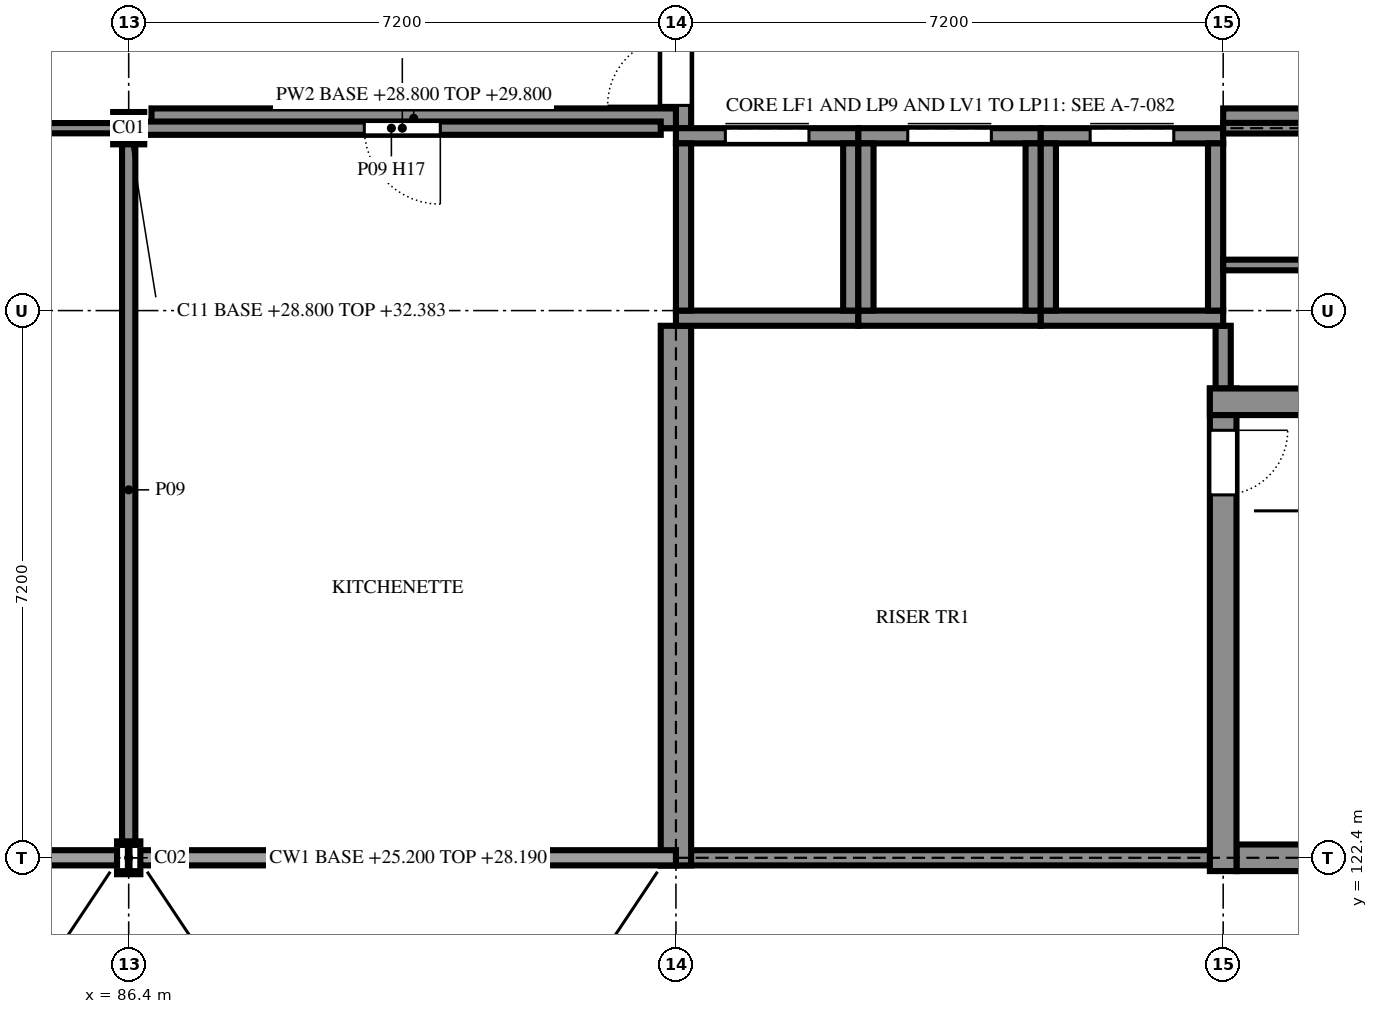
"""IFC4 building model, lengths in metres.
Left out: names, types, materials, properties, quantities, classifications, styles, units other than length and angle.
Written with IfcOpenShell. Run it as: python <this file> out.ifc"""

import sys

from ifc_helpers import new_model, si_unit, direction, frame, frame_2d, origin, origin_2d, place, context, subcontext, project, spatial, rectangle, i_section, extrude, element, fill, save


model = new_model("IFC4")
c1 = context("Model", 3, precision=1e-05, world=origin(), true_north=direction((0.0, 1.0)))
c2 = subcontext(c1, "Body", "Model", "MODEL_VIEW")
j1 = project(units=[si_unit("LENGTHUNIT", "METRE"), si_unit("PLANEANGLEUNIT", "RADIAN")], contexts=[c1])
p1 = place(None, origin())
s1 = spatial("IfcSite", under=j1, at=p1, CompositionType="ELEMENT")
p2 = place(p1, origin())
s2 = spatial("IfcBuilding", under=s1, at=p2, CompositionType="ELEMENT")
p3 = place(p2, frame((0.0, 0.0, 25.2)))
s3 = spatial("IfcBuildingStorey", under=s2, at=p3, CompositionType="ELEMENT", Elevation=25.2)
p4 = place(p3, frame((86.4, 122.4, 0.0), z_axis=(0.0, 0.0, 1.0), x_axis=(1.0, 0.0, 0.0)))
e1 = element("IfcColumn", 1, at=p4, inside=s3, PredefinedType="COLUMN", context=c2, shape_type="SweptSolid", body=[
    extrude(i_section(OverallWidth=0.307, OverallDepth=0.432, WebThickness=0.021, FlangeThickness=0.04, FilletRadius=0.027, at=origin_2d()), origin(), (0.0, 0.0, 1.0), 3.6),
])
p5 = place(p3, frame((86.4, 132.0, 0.0), z_axis=(0.0, 0.0, 1.0), x_axis=(1.0, 0.0, 0.0)))
e2 = element("IfcColumn", 2, at=p5, inside=s3, PredefinedType="COLUMN", context=c2, shape_type="SweptSolid", body=[
    extrude(i_section(OverallWidth=0.409, OverallDepth=0.425, WebThickness=0.033, FlangeThickness=0.052, FilletRadius=0.015, at=origin_2d()), origin(), (0.0, 0.0, 1.0), 3.6),
])
p6 = place(p3, frame((93.4, 122.4, 0.0), z_axis=(0.0, 0.0, 1.0), x_axis=(1.0, 0.0, 0.0)))
e3 = element("IfcWall", 3, at=p6, inside=s3, PredefinedType="SHEAR", context=c2, shape_type="SweptSolid", body=[
    extrude(rectangle(XDim=7.575, YDim=0.2, at=frame_2d((3.788, 0.0))), origin(), (0.0, 0.0, 1.0), 3.6),
])
p7 = place(p3, frame((100.975, 122.4, 0.0), z_axis=(0.0, 0.0, 1.0), x_axis=(1.0, 0.0, 0.0)))
e4 = element("IfcWall", 4, at=p7, inside=s3, PredefinedType="SHEAR", context=c2, shape_type="SweptSolid", body=[
    extrude(rectangle(XDim=3.225, YDim=0.35, at=frame_2d((1.612, 0.0))), origin(), (0.0, 0.0, 1.0), 3.6),
])
p8 = place(p7, frame((1.25, 0.0, 0.6)))
e5 = element("IfcOpeningElement", 5, at=p8, cuts=e4, PredefinedType="OPENING", context=c2, shape_type="SweptSolid", body=[
    extrude(rectangle(XDim=0.9, YDim=2.1, at=frame_2d((0.45, 1.05))), frame((0.0, 0.185, 0.0), z_axis=(0.0, -1.0, 0.0), x_axis=(1.0, 0.0, 0.0)), (0.0, 0.0, 1.0), 0.37),
])
p9 = place(p3, frame((100.8, 128.575, 0.0), z_axis=(0.0, 0.0, 1.0), x_axis=(0.0, -1.0, 0.0)))
e6 = element("IfcWall", 6, at=p9, inside=s3, PredefinedType="SHEAR", context=c2, shape_type="SweptSolid", body=[
    extrude(rectangle(XDim=6.35, YDim=0.35, at=frame_2d((3.175, 0.0))), origin(), (0.0, 0.0, 1.0), 3.6),
])
p10 = place(p9, frame((0.55, 0.0, 0.0)))
e7 = element("IfcOpeningElement", 7, at=p10, cuts=e6, PredefinedType="OPENING", context=c2, shape_type="SweptSolid", body=[
    extrude(rectangle(XDim=0.85, YDim=2.1, at=frame_2d((0.425, 1.05))), frame((0.0, 0.185, 0.0), z_axis=(0.0, -1.0, 0.0), x_axis=(1.0, 0.0, 0.0)), (0.0, 0.0, 1.0), 0.37),
])
p11 = place(p3, frame((100.8, 128.575, 0.0), z_axis=(0.0, 0.0, 1.0), x_axis=(0.0, 1.0, 0.0)))
e8 = element("IfcWall", 8, at=p11, inside=s3, PredefinedType="SHEAR", context=c2, shape_type="SweptSolid", body=[
    extrude(rectangle(XDim=0.825, YDim=0.2, at=frame_2d((0.413, 0.0))), origin(), (0.0, 0.0, 1.0), 3.6),
])
p12 = place(p3, frame((104.375, 128.4, 0.0), z_axis=(0.0, 0.0, 1.0), x_axis=(-1.0, 0.0, 0.0)))
e9 = element("IfcWall", 9, at=p12, inside=s3, PredefinedType="SHEAR", context=c2, shape_type="SweptSolid", body=[
    extrude(rectangle(XDim=3.75, YDim=0.35, at=frame_2d((1.875, 0.0))), origin(), (0.0, 0.0, 1.0), 3.6),
])
p13 = place(p12, frame((1.375, 0.0, 0.0)))
e10 = element("IfcOpeningElement", 10, at=p13, cuts=e9, PredefinedType="OPENING", context=c2, shape_type="SweptSolid", body=[
    extrude(rectangle(XDim=1.0, YDim=2.1, at=frame_2d((0.5, 1.05))), frame((0.0, 0.185, 0.0), z_axis=(0.0, -1.0, 0.0), x_axis=(1.0, 0.0, 0.0)), (0.0, 0.0, 1.0), 0.37),
])
p14 = place(p3, frame((93.6, 129.4, 0.0), z_axis=(0.0, 0.0, 1.0), x_axis=(0.0, -1.0, 0.0)))
e11 = element("IfcWall", 11, at=p14, inside=s3, PredefinedType="SHEAR", context=c2, shape_type="SweptSolid", body=[
    extrude(rectangle(XDim=7.1, YDim=0.4, at=frame_2d((3.55, 0.0))), origin(), (0.0, 0.0, 1.0), 3.6),
])
p15 = place(p3, frame((93.6, 132.0, 0.0), z_axis=(0.0, 0.0, 1.0), x_axis=(0.0, 1.0, 0.0)))
e12 = element("IfcWall", 12, at=p15, inside=s3, PredefinedType="SHEAR", context=c2, shape_type="SweptSolid", body=[
    extrude(rectangle(XDim=2.4, YDim=0.4, at=frame_2d((1.2, 0.0))), origin(), (0.0, 0.0, 1.0), 3.6),
])
p16 = place(p15, frame((0.3, 0.0, 0.0)))
e13 = element("IfcOpeningElement", 13, at=p16, cuts=e12, PredefinedType="OPENING", context=c2, shape_type="SweptSolid", body=[
    extrude(rectangle(XDim=1.8, YDim=2.1, at=frame_2d((0.9, 1.05))), frame((0.0, 0.21, 0.0), z_axis=(0.0, -1.0, 0.0), x_axis=(1.0, 0.0, 0.0)), (0.0, 0.0, 1.0), 0.42),
])
p17 = place(p3, frame((86.7, 132.13, 3.6), z_axis=(0.0, 0.0, 1.0), x_axis=(1.0, 0.0, 0.0)))
e14 = element("IfcWall", 14, at=p17, inside=s3, PredefinedType="PARAPET", context=c2, shape_type="SweptSolid", body=[
    extrude(rectangle(XDim=6.9, YDim=0.26, at=frame_2d((3.45, 0.0))), origin(), (0.0, 0.0, 1.0), 1.0),
])
p18 = place(p3, frame((100.8, 132.13, 3.6), z_axis=(0.0, 0.0, 1.0), x_axis=(1.0, 0.0, 0.0)))
e15 = element("IfcWall", 15, at=p18, inside=s3, PredefinedType="PARAPET", context=c2, shape_type="SweptSolid", body=[
    extrude(rectangle(XDim=4.8, YDim=0.26, at=frame_2d((2.4, 0.0))), origin(), (0.0, 0.0, 1.0), 1.0),
])
p19 = place(p3, frame((86.4, 132.0, 3.6), z_axis=(0.0, 0.0, 1.0), x_axis=(1.0, 0.0, 0.0)))
e16 = element("IfcColumn", 16, at=p19, inside=s3, PredefinedType="COLUMN", context=c2, shape_type="SweptSolid", body=[
    extrude(i_section(OverallWidth=0.2, OverallDepth=0.2, WebThickness=0.009, FlangeThickness=0.015, FilletRadius=0.018, at=origin_2d()), origin(), (0.0, 0.0, 1.0), 3.583),
])
p20 = place(p3, frame((93.6, 129.5, 0.0), z_axis=(0.0, 0.0, 1.0), x_axis=(1.0, 0.0, 0.0)))
e17 = element("IfcWall", 17, at=p20, inside=s3, PredefinedType="SHEAR", context=c2, shape_type="SweptSolid", body=[
    extrude(rectangle(XDim=2.4, YDim=0.2, at=frame_2d((1.2, 0.0))), origin(), (0.0, 0.0, 1.0), 4.5),
])
p21 = place(p3, frame((93.6, 131.9, 0.0), z_axis=(0.0, 0.0, 1.0), x_axis=(1.0, 0.0, 0.0)))
e18 = element("IfcWall", 18, at=p21, inside=s3, PredefinedType="SHEAR", context=c2, shape_type="SweptSolid", body=[
    extrude(rectangle(XDim=2.4, YDim=0.2, at=frame_2d((1.2, 0.0))), origin(), (0.0, 0.0, 1.0), 4.5),
])
p22 = place(p21, frame((0.65, 0.0, 0.0)))
e19 = element("IfcOpeningElement", 19, at=p22, cuts=e18, PredefinedType="OPENING", context=c2, shape_type="SweptSolid", body=[
    extrude(rectangle(XDim=1.1, YDim=2.1, at=frame_2d((0.55, 1.05))), frame((0.0, 0.11, 0.0), z_axis=(0.0, -1.0, 0.0), x_axis=(1.0, 0.0, 0.0)), (0.0, 0.0, 1.0), 0.22),
])
for number, where, z_axis, x_axis in (
    (20, (93.7, 129.6, 0.0), (0.0, 0.0, 1.0), (0.0, 1.0, 0.0)),
    (21, (95.9, 129.6, 0.0), (0.0, 0.0, 1.0), (0.0, 1.0, 0.0)),
):
    element("IfcWall", number, at=place(p3, frame(where, z_axis=z_axis, x_axis=x_axis)), inside=s3, PredefinedType="SHEAR", context=c2, shape_type="SweptSolid", body=[
        extrude(rectangle(XDim=2.2, YDim=0.2, at=frame_2d((1.1, 0.0))), origin(), (0.0, 0.0, 1.0), 4.5),
    ])
p23 = place(p3, frame((96.0, 129.5, 0.0), z_axis=(0.0, 0.0, 1.0), x_axis=(1.0, 0.0, 0.0)))
e22 = element("IfcWall", 22, at=p23, inside=s3, PredefinedType="SHEAR", context=c2, shape_type="SweptSolid", body=[
    extrude(rectangle(XDim=2.4, YDim=0.2, at=frame_2d((1.2, 0.0))), origin(), (0.0, 0.0, 1.0), 4.5),
])
p24 = place(p3, frame((96.0, 131.9, 0.0), z_axis=(0.0, 0.0, 1.0), x_axis=(1.0, 0.0, 0.0)))
e23 = element("IfcWall", 23, at=p24, inside=s3, PredefinedType="SHEAR", context=c2, shape_type="SweptSolid", body=[
    extrude(rectangle(XDim=2.4, YDim=0.2, at=frame_2d((1.2, 0.0))), origin(), (0.0, 0.0, 1.0), 4.5),
])
p25 = place(p24, frame((0.65, 0.0, 0.0)))
e24 = element("IfcOpeningElement", 24, at=p25, cuts=e23, PredefinedType="OPENING", context=c2, shape_type="SweptSolid", body=[
    extrude(rectangle(XDim=1.1, YDim=2.1, at=frame_2d((0.55, 1.05))), frame((0.0, 0.11, 0.0), z_axis=(0.0, -1.0, 0.0), x_axis=(1.0, 0.0, 0.0)), (0.0, 0.0, 1.0), 0.22),
])
for number, where, z_axis, x_axis in (
    (25, (96.1, 129.6, 0.0), (0.0, 0.0, 1.0), (0.0, 1.0, 0.0)),
    (26, (98.3, 129.6, 0.0), (0.0, 0.0, 1.0), (0.0, 1.0, 0.0)),
):
    element("IfcWall", number, at=place(p3, frame(where, z_axis=z_axis, x_axis=x_axis)), inside=s3, PredefinedType="SHEAR", context=c2, shape_type="SweptSolid", body=[
        extrude(rectangle(XDim=2.2, YDim=0.2, at=frame_2d((1.1, 0.0))), origin(), (0.0, 0.0, 1.0), 4.5),
    ])
p26 = place(p3, frame((98.4, 129.5, 0.0), z_axis=(0.0, 0.0, 1.0), x_axis=(1.0, 0.0, 0.0)))
e27 = element("IfcWall", 27, at=p26, inside=s3, PredefinedType="SHEAR", context=c2, shape_type="SweptSolid", body=[
    extrude(rectangle(XDim=2.4, YDim=0.2, at=frame_2d((1.2, 0.0))), origin(), (0.0, 0.0, 1.0), 4.5),
])
p27 = place(p3, frame((98.4, 131.9, 0.0), z_axis=(0.0, 0.0, 1.0), x_axis=(1.0, 0.0, 0.0)))
e28 = element("IfcWall", 28, at=p27, inside=s3, PredefinedType="SHEAR", context=c2, shape_type="SweptSolid", body=[
    extrude(rectangle(XDim=2.4, YDim=0.2, at=frame_2d((1.2, 0.0))), origin(), (0.0, 0.0, 1.0), 4.5),
])
p28 = place(p27, frame((0.65, 0.0, 0.0)))
e29 = element("IfcOpeningElement", 29, at=p28, cuts=e28, PredefinedType="OPENING", context=c2, shape_type="SweptSolid", body=[
    extrude(rectangle(XDim=1.1, YDim=2.1, at=frame_2d((0.55, 1.05))), frame((0.0, 0.11, 0.0), z_axis=(0.0, -1.0, 0.0), x_axis=(1.0, 0.0, 0.0)), (0.0, 0.0, 1.0), 0.22),
])
for number, where, z_axis, x_axis in (
    (30, (98.5, 129.6, 0.0), (0.0, 0.0, 1.0), (0.0, 1.0, 0.0)),
    (31, (100.7, 129.6, 0.0), (0.0, 0.0, 1.0), (0.0, 1.0, 0.0)),
):
    element("IfcWall", number, at=place(p3, frame(where, z_axis=z_axis, x_axis=x_axis)), inside=s3, PredefinedType="SHEAR", context=c2, shape_type="SweptSolid", body=[
        extrude(rectangle(XDim=2.2, YDim=0.2, at=frame_2d((1.1, 0.0))), origin(), (0.0, 0.0, 1.0), 4.5),
    ])
p29 = place(p3, frame((100.8, 130.2, 0.0), z_axis=(0.0, 0.0, 1.0), x_axis=(1.0, 0.0, 0.0)))
e32 = element("IfcWall", 32, at=p29, inside=s3, PredefinedType="PARTITIONING", context=c2, shape_type="SweptSolid", body=[
    extrude(rectangle(XDim=3.3, YDim=0.14, at=frame_2d((1.65, 0.0))), origin(), (0.0, 0.0, 1.0), 3.29),
])
p30 = place(p29, frame((1.2, 0.0, 0.0)))
e33 = element("IfcOpeningElement", 33, at=p30, cuts=e32, PredefinedType="OPENING", context=c2, shape_type="SweptSolid", body=[
    extrude(rectangle(XDim=1.0, YDim=2.1, at=frame_2d((0.5, 1.05))), frame((0.0, 0.08, 0.0), z_axis=(0.0, -1.0, 0.0), x_axis=(1.0, 0.0, 0.0)), (0.0, 0.0, 1.0), 0.16),
])
p31 = place(p3, frame((74.143, 132.0, 0.0), z_axis=(0.0, 0.0, 1.0), x_axis=(1.0, 0.0, 0.0)))
e34 = element("IfcWall", 34, at=p31, inside=s3, PredefinedType="PARTITIONING", context=c2, shape_type="SweptSolid", body=[
    extrude(rectangle(XDim=12.345, YDim=0.135, at=frame_2d((6.172, 0.0))), origin(), (0.0, 0.0, 1.0), 2.99),
])
p32 = place(p31, frame((0.157, 0.0, 0.0)))
e35 = element("IfcOpeningElement", 35, at=p32, cuts=e34, PredefinedType="OPENING", context=c2, shape_type="SweptSolid", body=[
    extrude(rectangle(XDim=1.8, YDim=2.1, at=frame_2d((0.9, 1.05))), frame((0.0, 0.077, 0.0), z_axis=(0.0, -1.0, 0.0), x_axis=(1.0, 0.0, 0.0)), (0.0, 0.0, 1.0), 0.155),
])
p33 = place(p31, frame((6.857, 0.0, 0.0)))
e36 = element("IfcOpeningElement", 36, at=p33, cuts=e34, PredefinedType="OPENING", context=c2, shape_type="SweptSolid", body=[
    extrude(rectangle(XDim=1.8, YDim=2.1, at=frame_2d((0.9, 1.05))), frame((0.0, 0.077, 0.0), z_axis=(0.0, -1.0, 0.0), x_axis=(1.0, 0.0, 0.0)), (0.0, 0.0, 1.0), 0.155),
])
p34 = place(p3, frame((86.312, 132.0, 0.0), z_axis=(0.0, 0.0, 1.0), x_axis=(1.0, 0.0, 0.0)))
e37 = element("IfcWall", 37, at=p34, inside=s3, PredefinedType="PARTITIONING", context=c2, shape_type="SweptSolid", body=[
    extrude(rectangle(XDim=7.087, YDim=0.175, at=frame_2d((3.544, 0.0))), origin(), (0.0, 0.0, 1.0), 2.99),
])
p35 = place(p34, frame((3.188, 0.0, 0.0)))
e38 = element("IfcOpeningElement", 38, at=p35, cuts=e37, PredefinedType="OPENING", context=c2, shape_type="SweptSolid", body=[
    extrude(rectangle(XDim=1.0, YDim=2.4, at=frame_2d((0.5, 1.2))), frame((0.0, 0.097, 0.0), z_axis=(0.0, -1.0, 0.0), x_axis=(1.0, 0.0, 0.0)), (0.0, 0.0, 1.0), 0.195),
])
p36 = place(p3, frame((100.8, 132.0, 0.0), z_axis=(0.0, 0.0, 1.0), x_axis=(1.0, 0.0, 0.0)))
e39 = element("IfcWall", 39, at=p36, inside=s3, PredefinedType="PARTITIONING", context=c2, shape_type="SweptSolid", body=[
    extrude(rectangle(XDim=3.3, YDim=0.14, at=frame_2d((1.65, 0.0))), origin(), (0.0, 0.0, 1.0), 3.29),
])
p37 = place(p36, frame((1.2, 0.0, 0.0)))
e40 = element("IfcOpeningElement", 40, at=p37, cuts=e39, PredefinedType="OPENING", context=c2, shape_type="SweptSolid", body=[
    extrude(rectangle(XDim=1.0, YDim=2.1, at=frame_2d((0.5, 1.05))), frame((0.0, 0.08, 0.0), z_axis=(0.0, -1.0, 0.0), x_axis=(1.0, 0.0, 0.0)), (0.0, 0.0, 1.0), 0.16),
])
p38 = place(p3, frame((86.4, 122.57, 0.0), z_axis=(0.0, 0.0, 1.0), x_axis=(0.0, 1.0, 0.0)))
e41 = element("IfcWall", 41, at=p38, inside=s3, PredefinedType="PARTITIONING", context=c2, shape_type="SweptSolid", body=[
    extrude(rectangle(XDim=9.343, YDim=0.175, at=frame_2d((4.671, 0.0))), origin(), (0.0, 0.0, 1.0), 2.89),
])
p39 = place(p22, origin())
e42 = element("IfcDoor", 42, at=p39, inside=s3, OperationType="SLIDING_TO_LEFT", PredefinedType="DOOR", context=c2, shape_type="SweptSolid", body=[
    extrude(rectangle(XDim=1.1, YDim=2.1, at=frame_2d((0.55, 1.05))), frame((0.0, 0.025, 0.0), z_axis=(0.0, -1.0, 0.0), x_axis=(1.0, 0.0, 0.0)), (0.0, 0.0, 1.0), 0.05),
])
fill(e19, e42)
p40 = place(p25, origin())
e43 = element("IfcDoor", 43, at=p40, inside=s3, OperationType="SLIDING_TO_LEFT", PredefinedType="DOOR", context=c2, shape_type="SweptSolid", body=[
    extrude(rectangle(XDim=1.1, YDim=2.1, at=frame_2d((0.55, 1.05))), frame((0.0, 0.025, 0.0), z_axis=(0.0, -1.0, 0.0), x_axis=(1.0, 0.0, 0.0)), (0.0, 0.0, 1.0), 0.05),
])
fill(e24, e43)
p41 = place(p28, origin())
e44 = element("IfcDoor", 44, at=p41, inside=s3, OperationType="SLIDING_TO_LEFT", PredefinedType="DOOR", context=c2, shape_type="SweptSolid", body=[
    extrude(rectangle(XDim=1.1, YDim=2.1, at=frame_2d((0.55, 1.05))), frame((0.0, 0.025, 0.0), z_axis=(0.0, -1.0, 0.0), x_axis=(1.0, 0.0, 0.0)), (0.0, 0.0, 1.0), 0.05),
])
fill(e29, e44)
p42 = place(p35, frame((1.0, 0.0, 0.0), z_axis=(0.0, 0.0, 1.0), x_axis=(-1.0, 0.0, 0.0)))
e45 = element("IfcDoor", 45, at=p42, inside=s3, OperationType="SINGLE_SWING_RIGHT", PredefinedType="DOOR", context=c2, shape_type="SweptSolid", body=[
    extrude(rectangle(XDim=1.0, YDim=2.4, at=frame_2d((0.5, 1.2))), frame((0.0, 0.025, 0.0), z_axis=(0.0, -1.0, 0.0), x_axis=(1.0, 0.0, 0.0)), (0.0, 0.0, 1.0), 0.05),
])
fill(e38, e45)
p43 = place(p10, origin())
e46 = element("IfcDoor", 46, at=p43, inside=s3, OperationType="SINGLE_SWING_RIGHT", PredefinedType="DOOR", context=c2, shape_type="SweptSolid", body=[
    extrude(rectangle(XDim=0.85, YDim=2.1, at=frame_2d((0.425, 1.05))), frame((0.0, 0.025, 0.0), z_axis=(0.0, -1.0, 0.0), x_axis=(1.0, 0.0, 0.0)), (0.0, 0.0, 1.0), 0.05),
])
fill(e7, e46)
p44 = place(p16, origin())
e47 = element("IfcDoor", 47, at=p44, inside=s3, OperationType="DOUBLE_DOOR_SINGLE_SWING", PredefinedType="DOOR", context=c2, shape_type="SweptSolid", body=[
    extrude(rectangle(XDim=1.8, YDim=2.1, at=frame_2d((0.9, 1.05))), frame((0.0, 0.025, 0.0), z_axis=(0.0, -1.0, 0.0), x_axis=(1.0, 0.0, 0.0)), (0.0, 0.0, 1.0), 0.05),
])
fill(e13, e47)
save(model, sys.argv[1])
